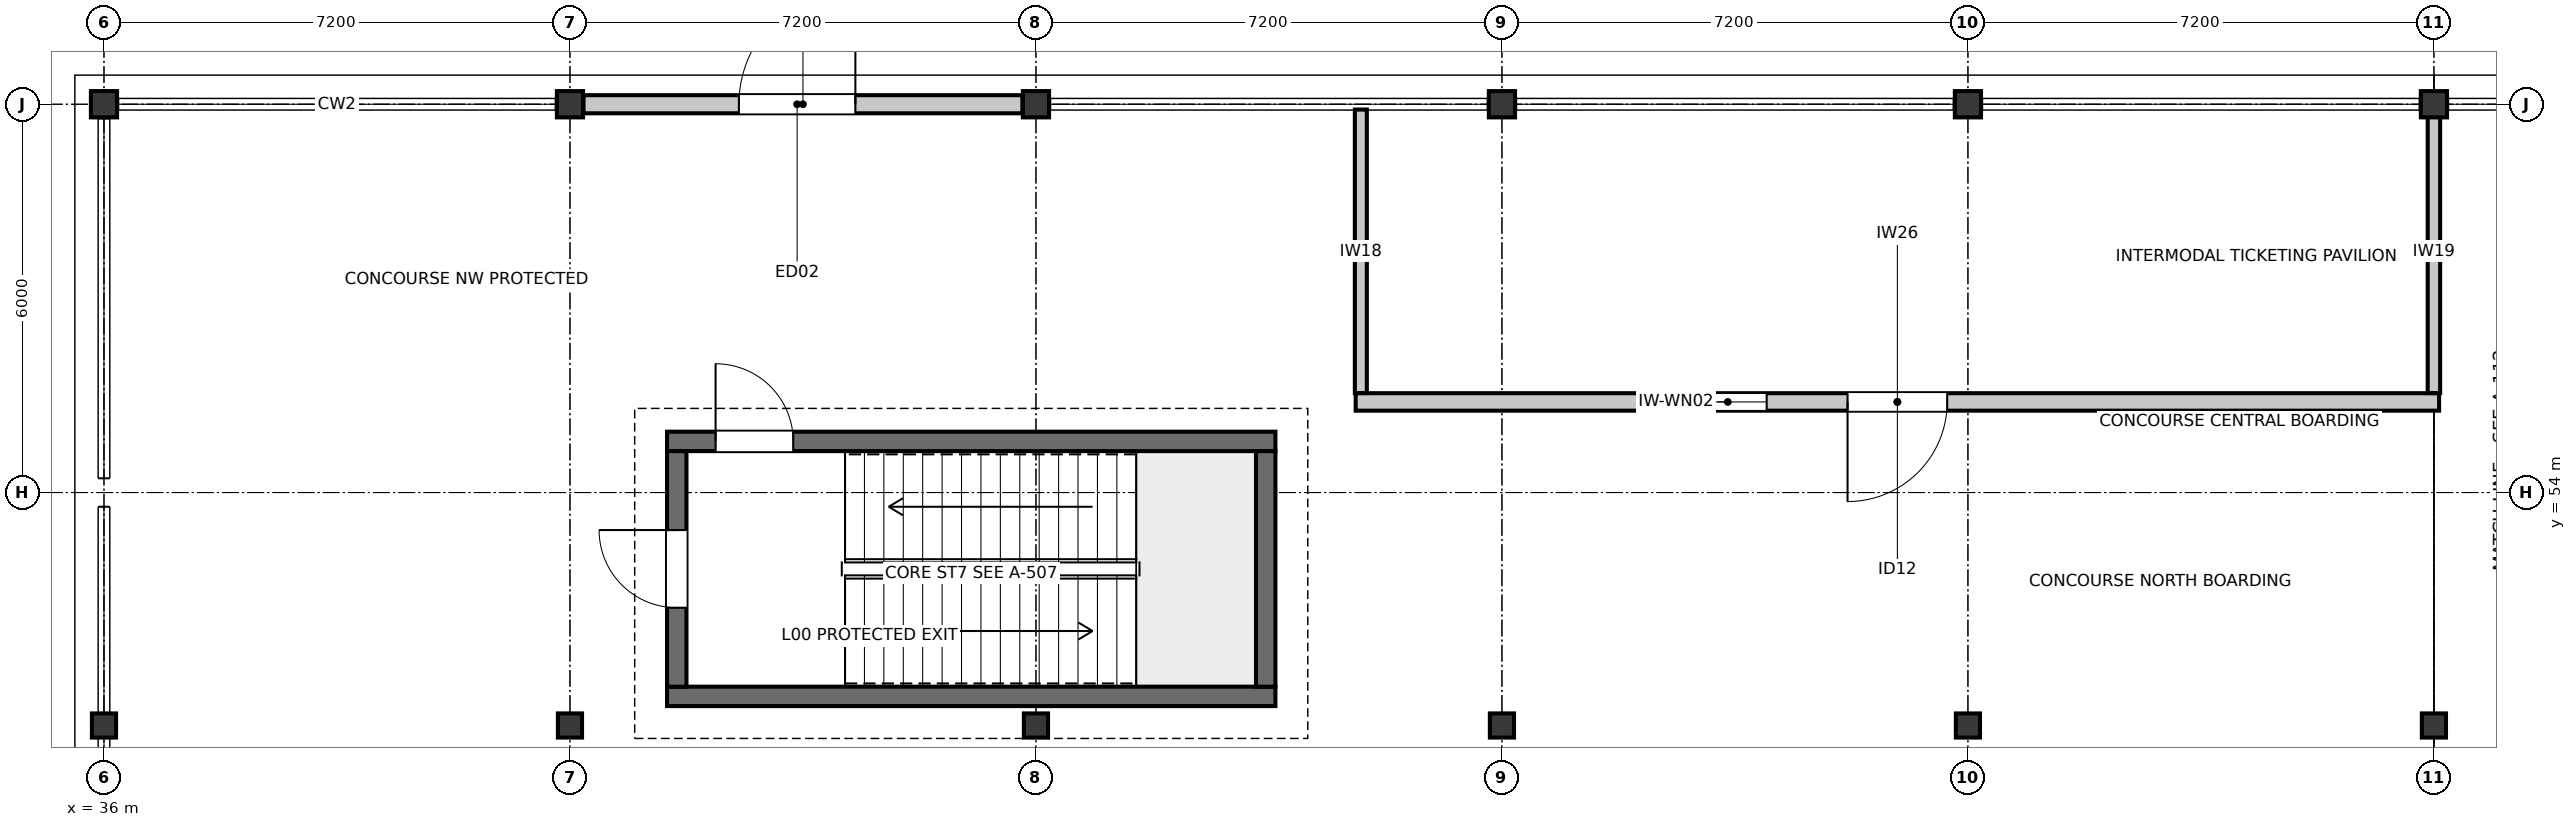
"""IFC4 building model, lengths in metres.
Left out: names, types, materials, properties, quantities, classifications, styles, units other than length and angle.
Written with IfcOpenShell. Run it as: python <this file> out.ifc"""

import sys

from ifc_helpers import new_model, si_unit, direction, frame, frame_2d, origin, origin_2d, place, context, subcontext, project, spatial, rectangle, i_section, extrude, element, fill, save


model = new_model("IFC4")
c1 = context("Model", 3, precision=1e-05, world=origin(), true_north=direction((0.0, 1.0)))
c2 = subcontext(c1, "Body", "Model", "MODEL_VIEW")
j1 = project(units=[si_unit("LENGTHUNIT", "METRE"), si_unit("PLANEANGLEUNIT", "RADIAN")], contexts=[c1])
p1 = place(None, origin())
s1 = spatial("IfcSite", under=j1, at=p1, CompositionType="ELEMENT")
p2 = place(p1, origin())
s2 = spatial("IfcBuilding", under=s1, at=p2, CompositionType="ELEMENT")
p3 = place(p2, origin())
s3 = spatial("IfcBuildingStorey", under=s2, at=p3, CompositionType="ELEMENT", Elevation=0.0)
p4 = place(p3, frame((36.0, 50.4, 0.0), z_axis=(0.0, 0.0, 1.0), x_axis=(1.0, 0.0, 0.0)))
e1 = element("IfcColumn", 1, at=p4, inside=s3, PredefinedType="COLUMN", context=c2, shape_type="SweptSolid", body=[
    extrude(i_section(OverallWidth=0.373, OverallDepth=0.373, WebThickness=0.016, FlangeThickness=0.026, FilletRadius=0.015, at=origin_2d()), origin(), (0.0, 0.0, 1.0), 5.4),
])
p5 = place(p3, frame((36.0, 60.0, 0.0), z_axis=(0.0, 0.0, 1.0), x_axis=(1.0, 0.0, 0.0)))
e2 = element("IfcColumn", 2, at=p5, inside=s3, PredefinedType="COLUMN", context=c2, shape_type="SweptSolid", body=[
    extrude(i_section(OverallWidth=0.404, OverallDepth=0.406, WebThickness=0.027, FlangeThickness=0.044, FilletRadius=0.015, at=origin_2d()), origin(), (0.0, 0.0, 1.0), 6.0),
])
p6 = place(p3, frame((43.2, 50.4, 0.0), z_axis=(0.0, 0.0, 1.0), x_axis=(1.0, 0.0, 0.0)))
e3 = element("IfcColumn", 3, at=p6, inside=s3, PredefinedType="COLUMN", context=c2, shape_type="SweptSolid", body=[
    extrude(i_section(OverallWidth=0.373, OverallDepth=0.373, WebThickness=0.016, FlangeThickness=0.026, FilletRadius=0.015, at=origin_2d()), origin(), (0.0, 0.0, 1.0), 5.4),
])
p7 = place(p3, frame((43.2, 60.0, 0.0), z_axis=(0.0, 0.0, 1.0), x_axis=(1.0, 0.0, 0.0)))
e4 = element("IfcColumn", 4, at=p7, inside=s3, PredefinedType="COLUMN", context=c2, shape_type="SweptSolid", body=[
    extrude(i_section(OverallWidth=0.404, OverallDepth=0.406, WebThickness=0.027, FlangeThickness=0.044, FilletRadius=0.015, at=origin_2d()), origin(), (0.0, 0.0, 1.0), 6.0),
])
p8 = place(p3, frame((50.4, 50.4, 0.0), z_axis=(0.0, 0.0, 1.0), x_axis=(1.0, 0.0, 0.0)))
e5 = element("IfcColumn", 5, at=p8, inside=s3, PredefinedType="COLUMN", context=c2, shape_type="SweptSolid", body=[
    extrude(i_section(OverallWidth=0.373, OverallDepth=0.373, WebThickness=0.016, FlangeThickness=0.026, FilletRadius=0.015, at=origin_2d()), origin(), (0.0, 0.0, 1.0), 5.4),
])
p9 = place(p3, frame((50.4, 60.0, 0.0), z_axis=(0.0, 0.0, 1.0), x_axis=(1.0, 0.0, 0.0)))
e6 = element("IfcColumn", 6, at=p9, inside=s3, PredefinedType="COLUMN", context=c2, shape_type="SweptSolid", body=[
    extrude(i_section(OverallWidth=0.404, OverallDepth=0.406, WebThickness=0.027, FlangeThickness=0.044, FilletRadius=0.015, at=origin_2d()), origin(), (0.0, 0.0, 1.0), 6.0),
])
p10 = place(p3, frame((57.6, 50.4, 0.0), z_axis=(0.0, 0.0, 1.0), x_axis=(1.0, 0.0, 0.0)))
e7 = element("IfcColumn", 7, at=p10, inside=s3, PredefinedType="COLUMN", context=c2, shape_type="SweptSolid", body=[
    extrude(i_section(OverallWidth=0.373, OverallDepth=0.373, WebThickness=0.016, FlangeThickness=0.026, FilletRadius=0.015, at=origin_2d()), origin(), (0.0, 0.0, 1.0), 5.4),
])
p11 = place(p3, frame((57.6, 60.0, 0.0), z_axis=(0.0, 0.0, 1.0), x_axis=(1.0, 0.0, 0.0)))
e8 = element("IfcColumn", 8, at=p11, inside=s3, PredefinedType="COLUMN", context=c2, shape_type="SweptSolid", body=[
    extrude(i_section(OverallWidth=0.404, OverallDepth=0.406, WebThickness=0.027, FlangeThickness=0.044, FilletRadius=0.015, at=origin_2d()), origin(), (0.0, 0.0, 1.0), 6.0),
])
p12 = place(p3, frame((64.8, 50.4, 0.0), z_axis=(0.0, 0.0, 1.0), x_axis=(1.0, 0.0, 0.0)))
e9 = element("IfcColumn", 9, at=p12, inside=s3, PredefinedType="COLUMN", context=c2, shape_type="SweptSolid", body=[
    extrude(i_section(OverallWidth=0.373, OverallDepth=0.373, WebThickness=0.016, FlangeThickness=0.026, FilletRadius=0.015, at=origin_2d()), origin(), (0.0, 0.0, 1.0), 5.4),
])
p13 = place(p3, frame((64.8, 60.0, 0.0), z_axis=(0.0, 0.0, 1.0), x_axis=(1.0, 0.0, 0.0)))
e10 = element("IfcColumn", 10, at=p13, inside=s3, PredefinedType="COLUMN", context=c2, shape_type="SweptSolid", body=[
    extrude(i_section(OverallWidth=0.404, OverallDepth=0.406, WebThickness=0.027, FlangeThickness=0.044, FilletRadius=0.015, at=origin_2d()), origin(), (0.0, 0.0, 1.0), 6.0),
])
p14 = place(p3, frame((72.0, 50.4, 0.0), z_axis=(0.0, 0.0, 1.0), x_axis=(1.0, 0.0, 0.0)))
e11 = element("IfcColumn", 11, at=p14, inside=s3, PredefinedType="COLUMN", context=c2, shape_type="SweptSolid", body=[
    extrude(i_section(OverallWidth=0.373, OverallDepth=0.373, WebThickness=0.016, FlangeThickness=0.026, FilletRadius=0.015, at=origin_2d()), origin(), (0.0, 0.0, 1.0), 5.4),
])
p15 = place(p3, frame((72.0, 60.0, 0.0), z_axis=(0.0, 0.0, 1.0), x_axis=(1.0, 0.0, 0.0)))
e12 = element("IfcColumn", 12, at=p15, inside=s3, PredefinedType="COLUMN", context=c2, shape_type="SweptSolid", body=[
    extrude(i_section(OverallWidth=0.404, OverallDepth=0.406, WebThickness=0.027, FlangeThickness=0.044, FilletRadius=0.015, at=origin_2d()), origin(), (0.0, 0.0, 1.0), 6.0),
])
p16 = place(p3, frame((43.409, 60.0, 0.0), z_axis=(0.0, 0.0, 1.0), x_axis=(1.0, 0.0, 0.0)))
e13 = element("IfcWall", 13, at=p16, inside=s3, PredefinedType="STANDARD", context=c2, shape_type="SweptSolid", body=[
    extrude(rectangle(XDim=6.782, YDim=0.28, at=frame_2d((3.391, 0.0))), origin(), (0.0, 0.0, 1.0), 4.482),
])
p17 = place(p16, frame((2.401, 0.0, 0.0)))
e14 = element("IfcOpeningElement", 14, at=p17, cuts=e13, PredefinedType="OPENING", context=c2, shape_type="SweptSolid", body=[
    extrude(rectangle(XDim=1.8, YDim=2.2, at=frame_2d((0.9, 1.1))), frame((0.0, 0.15, 0.0), z_axis=(0.0, -1.0, 0.0), x_axis=(1.0, 0.0, 0.0)), (0.0, 0.0, 1.0), 0.3),
])
p18 = place(p3, frame((54.1, 50.85, 0.0), z_axis=(0.0, 0.0, 1.0), x_axis=(-1.0, 0.0, 0.0)))
e15 = element("IfcWall", 15, at=p18, inside=s3, PredefinedType="SOLIDWALL", context=c2, shape_type="SweptSolid", body=[
    extrude(rectangle(XDim=9.4, YDim=0.3, at=frame_2d((4.7, 0.0))), origin(), (0.0, 0.0, 1.0), 5.18),
])
p19 = place(p3, frame((44.7, 54.79, 0.0), z_axis=(0.0, 0.0, 1.0), x_axis=(1.0, 0.0, 0.0)))
e16 = element("IfcWall", 16, at=p19, inside=s3, PredefinedType="SOLIDWALL", context=c2, shape_type="SweptSolid", body=[
    extrude(rectangle(XDim=9.4, YDim=0.3, at=frame_2d((4.7, 0.0))), origin(), (0.0, 0.0, 1.0), 5.18),
])
p20 = place(p19, frame((0.75, 0.0, 0.0)))
e17 = element("IfcOpeningElement", 17, at=p20, cuts=e16, PredefinedType="OPENING", context=c2, shape_type="SweptSolid", body=[
    extrude(rectangle(XDim=1.2, YDim=2.2, at=frame_2d((0.6, 1.1))), frame((0.0, 0.16, 0.0), z_axis=(0.0, -1.0, 0.0), x_axis=(1.0, 0.0, 0.0)), (0.0, 0.0, 1.0), 0.32),
])
p21 = place(p3, frame((44.85, 51.0, 0.0), z_axis=(0.0, 0.0, 1.0), x_axis=(0.0, 1.0, 0.0)))
e18 = element("IfcWall", 18, at=p21, inside=s3, PredefinedType="SOLIDWALL", context=c2, shape_type="SweptSolid", body=[
    extrude(rectangle(XDim=3.64, YDim=0.3, at=frame_2d((1.82, 0.0))), origin(), (0.0, 0.0, 1.0), 5.18),
])
p22 = place(p21, frame((1.22, 0.0, 0.0)))
e19 = element("IfcOpeningElement", 19, at=p22, cuts=e18, PredefinedType="OPENING", context=c2, shape_type="SweptSolid", body=[
    extrude(rectangle(XDim=1.2, YDim=2.2, at=frame_2d((0.6, 1.1))), frame((0.0, 0.16, 0.0), z_axis=(0.0, -1.0, 0.0), x_axis=(1.0, 0.0, 0.0)), (0.0, 0.0, 1.0), 0.32),
])
p23 = place(p3, frame((53.95, 54.64, 0.0), z_axis=(0.0, 0.0, 1.0), x_axis=(0.0, -1.0, 0.0)))
e20 = element("IfcWall", 20, at=p23, inside=s3, PredefinedType="SOLIDWALL", context=c2, shape_type="SweptSolid", body=[
    extrude(rectangle(XDim=3.64, YDim=0.3, at=frame_2d((1.82, 0.0))), origin(), (0.0, 0.0, 1.0), 5.18),
])
p24 = place(p3, frame((72.08, 55.4, 0.0), z_axis=(0.0, 0.0, 1.0), x_axis=(-1.0, 0.0, 0.0)))
e21 = element("IfcWall", 21, at=p24, inside=s3, PredefinedType="PARTITIONING", context=c2, shape_type="SweptSolid", body=[
    extrude(rectangle(XDim=16.74, YDim=0.27, at=frame_2d((8.37, 0.0))), origin(), (0.0, 0.0, 1.0), 4.477),
])
p25 = place(p24, frame((7.6, 0.0, 0.0)))
e22 = element("IfcOpeningElement", 22, at=p25, cuts=e21, PredefinedType="OPENING", context=c2, shape_type="SweptSolid", body=[
    extrude(rectangle(XDim=1.54, YDim=2.1, at=frame_2d((0.77, 1.05))), frame((0.0, 0.145, 0.0), z_axis=(0.0, -1.0, 0.0), x_axis=(1.0, 0.0, 0.0)), (0.0, 0.0, 1.0), 0.29),
])
p26 = place(p24, frame((10.39, 0.0, 0.95)))
e23 = element("IfcOpeningElement", 23, at=p26, cuts=e21, PredefinedType="OPENING", context=c2, shape_type="SweptSolid", body=[
    extrude(rectangle(XDim=1.2, YDim=1.0, at=frame_2d((0.6, 0.5))), frame((0.0, 0.145, 0.0), z_axis=(0.0, -1.0, 0.0), x_axis=(1.0, 0.0, 0.0)), (0.0, 0.0, 1.0), 0.29),
])
p27 = place(p3, frame((55.42, 55.537, 0.0), z_axis=(0.0, 0.0, 1.0), x_axis=(0.0, 1.0, 0.0)))
e24 = element("IfcWall", 24, at=p27, inside=s3, PredefinedType="PARTITIONING", context=c2, shape_type="SweptSolid", body=[
    extrude(rectangle(XDim=4.381, YDim=0.185, at=frame_2d((2.19, 0.0))), origin(), (0.0, 0.0, 1.0), 4.477),
])
p28 = place(p3, frame((72.0, 59.918, 0.0), z_axis=(0.0, 0.0, 1.0), x_axis=(0.0, -1.0, 0.0)))
e25 = element("IfcWall", 25, at=p28, inside=s3, PredefinedType="PARTITIONING", context=c2, shape_type="SweptSolid", body=[
    extrude(rectangle(XDim=4.381, YDim=0.192, at=frame_2d((2.19, 0.0))), origin(), (0.0, 0.0, 1.0), 4.477),
])
p29 = place(p17, origin())
e26 = element("IfcDoor", 26, at=p29, inside=s3, OperationType="SINGLE_SWING_RIGHT", PredefinedType="DOOR", context=c2, shape_type="SweptSolid", body=[
    extrude(rectangle(XDim=1.8, YDim=2.2, at=frame_2d((0.9, 1.1))), frame((0.0, 0.025, 0.0), z_axis=(0.0, -1.0, 0.0), x_axis=(1.0, 0.0, 0.0)), (0.0, 0.0, 1.0), 0.05),
])
fill(e14, e26)
p30 = place(p20, origin())
e27 = element("IfcDoor", 27, at=p30, inside=s3, OperationType="SINGLE_SWING_LEFT", PredefinedType="DOOR", context=c2, shape_type="SweptSolid", body=[
    extrude(rectangle(XDim=1.2, YDim=2.2, at=frame_2d((0.6, 1.1))), frame((0.0, 0.025, 0.0), z_axis=(0.0, -1.0, 0.0), x_axis=(1.0, 0.0, 0.0)), (0.0, 0.0, 1.0), 0.05),
])
fill(e17, e27)
p31 = place(p22, origin())
e28 = element("IfcDoor", 28, at=p31, inside=s3, OperationType="SINGLE_SWING_RIGHT", PredefinedType="DOOR", context=c2, shape_type="SweptSolid", body=[
    extrude(rectangle(XDim=1.2, YDim=2.2, at=frame_2d((0.6, 1.1))), frame((0.0, 0.025, 0.0), z_axis=(0.0, -1.0, 0.0), x_axis=(1.0, 0.0, 0.0)), (0.0, 0.0, 1.0), 0.05),
])
fill(e19, e28)
p32 = place(p25, origin())
e29 = element("IfcDoor", 29, at=p32, inside=s3, OperationType="SINGLE_SWING_RIGHT", PredefinedType="DOOR", context=c2, shape_type="SweptSolid", body=[
    extrude(rectangle(XDim=1.54, YDim=2.1, at=frame_2d((0.77, 1.05))), frame((0.0, 0.025, 0.0), z_axis=(0.0, -1.0, 0.0), x_axis=(1.0, 0.0, 0.0)), (0.0, 0.0, 1.0), 0.05),
])
fill(e22, e29)
p33 = place(p26, origin())
e30 = element("IfcWindow", 30, at=p33, inside=s3, PartitioningType="SINGLE_PANEL", PredefinedType="WINDOW", context=c2, shape_type="SweptSolid", body=[
    extrude(rectangle(XDim=1.2, YDim=1.0, at=frame_2d((0.6, 0.5))), frame((0.0, 0.03, 0.0), z_axis=(0.0, -1.0, 0.0), x_axis=(1.0, 0.0, 0.0)), (0.0, 0.0, 1.0), 0.06),
])
fill(e23, e30)
save(model, sys.argv[1])
